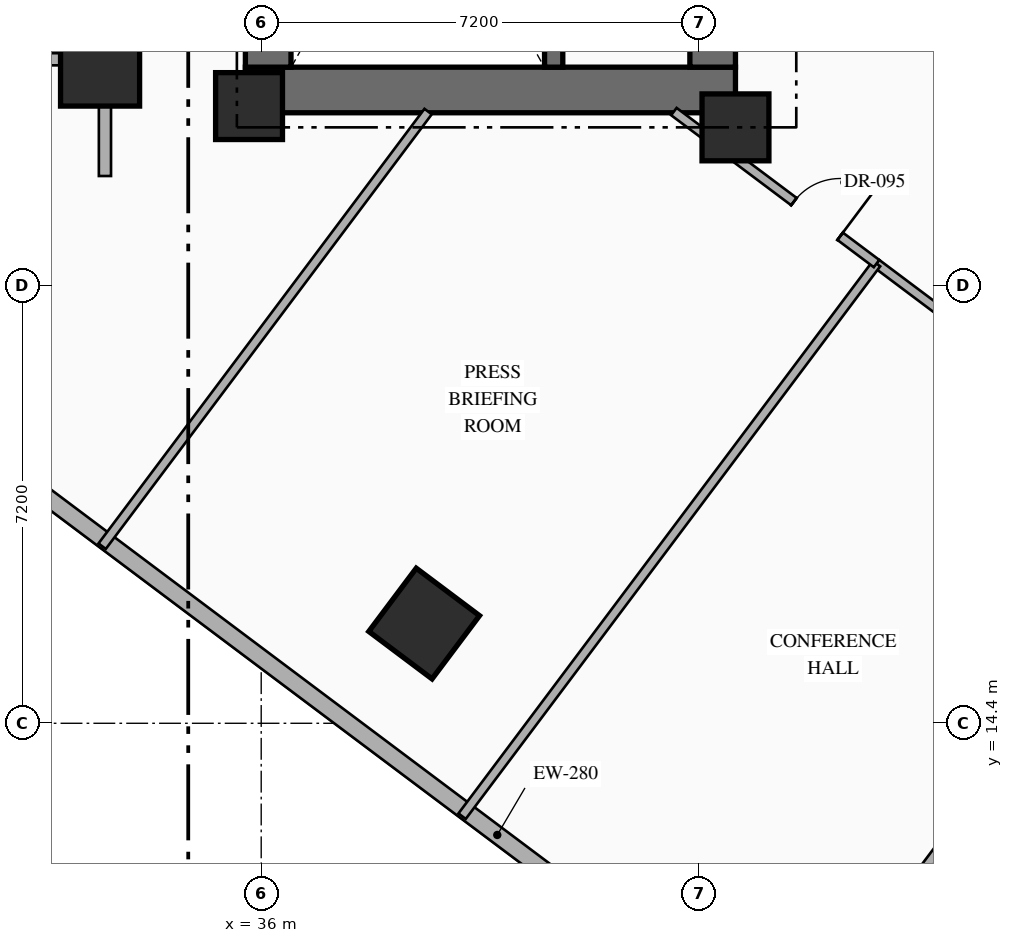
"""IFC4 building model, lengths in metres.
Left out: names, types, materials, properties, quantities, classifications, styles, units other than length and angle.
Written with IfcOpenShell. Run it as: python <this file> out.ifc"""

import sys

from ifc_helpers import new_model, si_unit, direction, frame, frame_2d, origin, origin_2d, place, context, subcontext, project, spatial, rectangle, extrude, element, fill, save


model = new_model("IFC4")
c1 = context("Model", 3, precision=1e-05, world=origin(), true_north=direction((0.0, 1.0)))
c2 = subcontext(c1, "Body", "Model", "MODEL_VIEW")
j1 = project(units=[si_unit("LENGTHUNIT", "METRE"), si_unit("PLANEANGLEUNIT", "RADIAN")], contexts=[c1])
p1 = place(None, origin())
s1 = spatial("IfcSite", under=j1, at=p1, CompositionType="ELEMENT")
p2 = place(p1, origin())
s2 = spatial("IfcBuilding", under=s1, at=p2, CompositionType="ELEMENT")
p3 = place(p2, frame((0.0, 0.0, 5.4)))
s3 = spatial("IfcBuildingStorey", under=s2, at=p3, CompositionType="ELEMENT", Elevation=5.4)
p4 = place(p3, frame((35.74, 24.815, 0.0), z_axis=(0.0, 0.0, 1.0), x_axis=(1.0, 0.0, 0.0)))
e1 = element("IfcWall", 1, at=p4, inside=s3, PredefinedType="SHEAR", context=c2, shape_type="SweptSolid", body=[
    extrude(rectangle(XDim=8.06, YDim=0.75, at=frame_2d((4.03, 0.0))), origin(), (0.0, 0.0, 1.0), 5.4),
])
p5 = place(p3, frame((36.115, 25.19, 0.0), z_axis=(0.0, 0.0, 1.0), x_axis=(0.0, 1.0, 0.0)))
e2 = element("IfcWall", 2, at=p5, inside=s3, PredefinedType="SHEAR", context=c2, shape_type="SweptSolid", body=[
    extrude(rectangle(XDim=9.48, YDim=0.75, at=frame_2d((4.74, 0.0))), origin(), (0.0, 0.0, 1.0), 5.4),
])
p6 = place(p3, frame((43.425, 25.19, 0.0), z_axis=(0.0, 0.0, 1.0), x_axis=(0.0, 1.0, 0.0)))
e3 = element("IfcWall", 3, at=p6, inside=s3, PredefinedType="SHEAR", context=c2, shape_type="SweptSolid", body=[
    extrude(rectangle(XDim=9.48, YDim=0.75, at=frame_2d((4.74, 0.0))), origin(), (0.0, 0.0, 1.0), 5.4),
])
p7 = place(p6, frame((1.21, 0.0, 0.0)))
e4 = element("IfcOpeningElement", 4, at=p7, cuts=e3, PredefinedType="OPENING", context=c2, shape_type="SweptSolid", body=[
    extrude(rectangle(XDim=0.85, YDim=2.08, at=frame_2d((0.425, 1.04))), frame((0.0, 0.385, 0.0), z_axis=(0.0, -1.0, 0.0), x_axis=(1.0, 0.0, 0.0)), (0.0, 0.0, 1.0), 0.77),
])
p8 = place(p6, frame((4.46, 0.0, 0.0)))
e5 = element("IfcOpeningElement", 5, at=p8, cuts=e3, PredefinedType="OPENING", context=c2, shape_type="SweptSolid", body=[
    extrude(rectangle(XDim=0.85, YDim=2.08, at=frame_2d((0.425, 1.04))), frame((0.0, 0.385, 0.0), z_axis=(0.0, -1.0, 0.0), x_axis=(1.0, 0.0, 0.0)), (0.0, 0.0, 1.0), 0.77),
])
p9 = place(p3, frame((40.81, 25.19, 0.0), z_axis=(0.0, 0.0, 1.0), x_axis=(0.0, 1.0, 0.0)))
e6 = element("IfcWall", 6, at=p9, inside=s3, PredefinedType="SHEAR", context=c2, shape_type="SweptSolid", body=[
    extrude(rectangle(XDim=9.48, YDim=0.3, at=frame_2d((4.74, 0.0))), origin(), (0.0, 0.0, 1.0), 5.4),
])
for number, where, z_axis, x_axis in (
    (7, (35.8, 24.55, 0.0), (0.0, 0.0, 1.0), (1.0, 0.0, 0.0)),
    (8, (43.8, 24.2, 0.0), (0.0, 0.0, 1.0), (1.0, 0.0, 0.0)),
):
    element("IfcColumn", number, at=place(p3, frame(where, z_axis=z_axis, x_axis=x_axis)), inside=s3, PredefinedType="COLUMN", context=c2, shape_type="SweptSolid", body=[
        extrude(rectangle(XDim=1.1, YDim=1.1, at=origin_2d()), origin(), (0.0, 0.0, 1.0), 5.4),
    ])
for number, where, z_axis, x_axis in (
    (9, (33.35, 25.2, 0.0), (0.0, 0.0, 1.0), (1.0, 0.0, 0.0)),
    (10, (38.68, 16.04, 0.0), (0.0, 0.0, 1.0), (0.8, -0.6, 0.0)),
):
    element("IfcColumn", number, at=place(p3, frame(where, z_axis=z_axis, x_axis=x_axis)), inside=s3, PredefinedType="COLUMN", context=c2, shape_type="SweptSolid", body=[
        extrude(rectangle(XDim=1.3, YDim=1.3, at=origin_2d()), origin(), (0.0, 0.0, 1.0), 5.4),
    ])
p10 = place(p3, frame((54.518, 1.587, 0.0), z_axis=(0.0, 0.0, 1.0), x_axis=(-0.800001601415, 0.599997864774, 0.0)))
e11 = element("IfcWall", 11, at=p10, inside=s3, PredefinedType="STANDARD", context=c2, shape_type="SweptSolid", body=[
    extrude(rectangle(XDim=36.589, YDim=0.28, at=frame_2d((18.294, 0.0))), origin(), (0.0, 0.0, 1.0), 5.1),
])
p11 = place(p3, frame((33.43, 23.4, 0.0), z_axis=(0.0, 0.0, 1.0), x_axis=(0.0, 1.0, 0.0)))
e12 = element("IfcWall", 12, at=p11, inside=s3, PredefinedType="STANDARD", context=c2, shape_type="SweptSolid", body=[
    extrude(rectangle(XDim=4.08, YDim=0.2, at=frame_2d((2.04, 0.0))), origin(), (0.0, 0.0, 1.0), 3.895),
])
p12 = place(p3, frame((25.55, 25.32, 0.0), z_axis=(0.0, 0.0, 1.0), x_axis=(1.0, 0.0, 0.0)))
e13 = element("IfcWall", 13, at=p12, inside=s3, PredefinedType="STANDARD", context=c2, shape_type="SweptSolid", body=[
    extrude(rectangle(XDim=7.88, YDim=0.2, at=frame_2d((3.94, 0.0))), origin(), (0.0, 0.0, 1.0), 4.495),
])
p13 = place(p3, frame((46.12, 21.96, 0.0), z_axis=(0.0, 0.0, 1.0), x_axis=(0.799991121809, -0.600011837406, 0.0)))
e14 = element("IfcWall", 14, at=p13, inside=s3, PredefinedType="PARTITIONING", context=c2, shape_type="SweptSolid", body=[
    extrude(rectangle(XDim=6.6, YDim=0.15, at=frame_2d((3.3, 0.0))), origin(), (0.0, 0.0, 1.0), 5.1),
])
p14 = place(p13, frame((2.6, 0.0, 0.0)))
e15 = element("IfcOpeningElement", 15, at=p14, cuts=e14, PredefinedType="OPENING", context=c2, shape_type="SweptSolid", body=[
    extrude(rectangle(XDim=1.4, YDim=2.3, at=frame_2d((0.7, 1.15))), frame((0.0, 0.085, 0.0), z_axis=(0.0, -1.0, 0.0), x_axis=(1.0, 0.0, 0.0)), (0.0, 0.0, 1.0), 0.17),
])
p15 = place(p3, frame((39.304, 12.872, 0.0), z_axis=(0.0, 0.0, 1.0), x_axis=(0.600013754301, 0.79998968409, 0.0)))
e16 = element("IfcWall", 16, at=p15, inside=s3, PredefinedType="PARTITIONING", context=c2, shape_type="SweptSolid", body=[
    extrude(rectangle(XDim=11.36, YDim=0.15, at=frame_2d((5.68, 0.0))), origin(), (0.0, 0.0, 1.0), 5.1),
])
p16 = place(p3, frame((44.584, 8.912, 0.0), z_axis=(0.0, 0.0, 1.0), x_axis=(0.6, 0.8, 0.0)))
e17 = element("IfcWall", 17, at=p16, inside=s3, PredefinedType="PARTITIONING", context=c2, shape_type="SweptSolid", body=[
    extrude(rectangle(XDim=11.36, YDim=0.15, at=frame_2d((5.68, 0.0))), origin(), (0.0, 0.0, 1.0), 5.1),
])
p17 = place(p3, frame((42.787, 24.46, 0.0), z_axis=(0.0, 0.0, 1.0), x_axis=(0.799971872363, -0.600037501685, 0.0)))
e18 = element("IfcWall", 18, at=p17, inside=s3, PredefinedType="PARTITIONING", context=c2, shape_type="SweptSolid", body=[
    extrude(rectangle(XDim=4.167, YDim=0.15, at=frame_2d((2.083, 0.0))), origin(), (0.0, 0.0, 1.0), 5.1),
])
p18 = place(p17, frame((2.468, 0.0, 0.0)))
e19 = element("IfcOpeningElement", 19, at=p18, cuts=e18, PredefinedType="OPENING", context=c2, shape_type="SweptSolid", body=[
    extrude(rectangle(XDim=0.95, YDim=2.15, at=frame_2d((0.475, 1.075))), frame((0.0, 0.085, 0.0), z_axis=(0.0, -1.0, 0.0), x_axis=(1.0, 0.0, 0.0)), (0.0, 0.0, 1.0), 0.17),
])
p19 = place(p3, frame((33.384, 17.312, 0.0), z_axis=(0.0, 0.0, 1.0), x_axis=(0.600008743659, 0.799993442181, 0.0)))
e20 = element("IfcWall", 20, at=p19, inside=s3, PredefinedType="PARTITIONING", context=c2, shape_type="SweptSolid", body=[
    extrude(rectangle(XDim=8.935, YDim=0.15, at=frame_2d((4.468, 0.0))), origin(), (0.0, 0.0, 1.0), 5.1),
])
p20 = place(p18, origin())
e21 = element("IfcDoor", 21, at=p20, inside=s3, OperationType="SINGLE_SWING_RIGHT", PredefinedType="DOOR", context=c2, shape_type="SweptSolid", body=[
    extrude(rectangle(XDim=0.95, YDim=2.15, at=frame_2d((0.475, 1.075))), frame((0.0, 0.025, 0.0), z_axis=(0.0, -1.0, 0.0), x_axis=(1.0, 0.0, 0.0)), (0.0, 0.0, 1.0), 0.05),
])
fill(e19, e21)
save(model, sys.argv[1])
